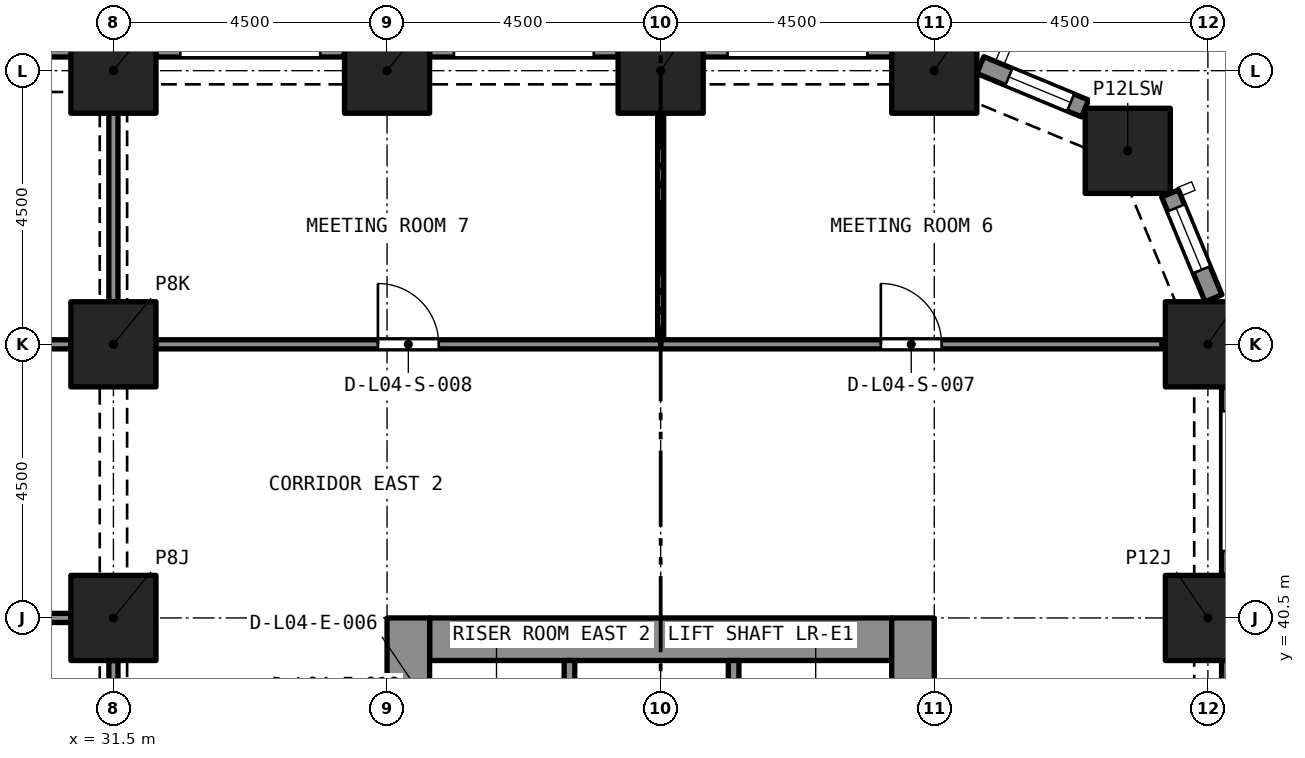
"""IFC4 building model, lengths in metres.
Left out: names, types, materials, properties, quantities, classifications, styles, units other than length and angle.
Written with IfcOpenShell. Run it as: python <this file> out.ifc"""

import sys

from ifc_helpers import new_model, si_unit, direction, frame, frame_2d, origin, origin_2d, place, context, subcontext, project, spatial, rectangle, extrude, element, fill, save


model = new_model("IFC4")
c1 = context("Model", 3, precision=1e-05, world=origin(), true_north=direction((0.0, 1.0)))
c2 = subcontext(c1, "Body", "Model", "MODEL_VIEW")
j1 = project(units=[si_unit("LENGTHUNIT", "METRE"), si_unit("PLANEANGLEUNIT", "RADIAN")], contexts=[c1])
p1 = place(None, origin())
s1 = spatial("IfcSite", under=j1, at=p1, CompositionType="ELEMENT")
p2 = place(p1, origin())
s2 = spatial("IfcBuilding", under=s1, at=p2, CompositionType="ELEMENT")
p3 = place(p2, frame((0.0, 0.0, 21.0)))
s3 = spatial("IfcBuildingStorey", under=s2, at=p3, CompositionType="ELEMENT", Elevation=21.0)
for number, where, z_axis, x_axis in (
    (1, (31.5, 40.5, 0.0), (0.0, 0.0, 1.0), (1.0, 0.0, 0.0)),
    (2, (49.5, 40.5, 0.0), (0.0, 0.0, 1.0), (1.0, 0.0, 0.0)),
    (3, (31.5, 45.0, 0.0), (0.0, 0.0, 1.0), (1.0, 0.0, 0.0)),
    (4, (49.5, 45.0, 0.0), (0.0, 0.0, 1.0), (1.0, 0.0, 0.0)),
    (5, (48.182, 48.182, 0.0), (0.0, 0.0, 1.0), (1.0, 0.0, 0.0)),
    (6, (31.5, 49.5, 0.0), (0.0, 0.0, 1.0), (1.0, 0.0, 0.0)),
    (7, (36.0, 49.5, 0.0), (0.0, 0.0, 1.0), (1.0, 0.0, 0.0)),
    (8, (40.5, 49.5, 0.0), (0.0, 0.0, 1.0), (1.0, 0.0, 0.0)),
    (9, (45.0, 49.5, 0.0), (0.0, 0.0, 1.0), (1.0, 0.0, 0.0)),
):
    element("IfcColumn", number, at=place(p3, frame(where, z_axis=z_axis, x_axis=x_axis)), inside=s3, PredefinedType="COLUMN", context=c2, shape_type="SweptSolid", body=[
        extrude(rectangle(XDim=1.4, YDim=1.4, at=origin_2d()), origin(), (0.0, 0.0, 1.0), 5.0),
    ])
p4 = place(p3, frame((36.7, 40.15, 0.0), z_axis=(0.0, 0.0, 1.0), x_axis=(1.0, 0.0, 0.0)))
e10 = element("IfcWall", 10, at=p4, inside=s3, PredefinedType="SOLIDWALL", context=c2, shape_type="SweptSolid", body=[
    extrude(rectangle(XDim=7.6, YDim=0.7, at=frame_2d((3.8, 0.0))), origin(), (0.0, 0.0, 1.0), 5.0),
])
p5 = place(p3, frame((36.35, 27.0, 0.0), z_axis=(0.0, 0.0, 1.0), x_axis=(0.0, 1.0, 0.0)))
e11 = element("IfcWall", 11, at=p5, inside=s3, PredefinedType="SOLIDWALL", context=c2, shape_type="SweptSolid", body=[
    extrude(rectangle(XDim=13.5, YDim=0.7, at=frame_2d((6.75, 0.0))), origin(), (0.0, 0.0, 1.0), 5.0),
])
p6 = place(p5, frame((8.95, 0.0, 0.0)))
e12 = element("IfcOpeningElement", 12, at=p6, cuts=e11, PredefinedType="OPENING", context=c2, shape_type="SweptSolid", body=[
    extrude(rectangle(XDim=1.2, YDim=2.1, at=frame_2d((0.6, 1.05))), frame((0.0, 0.36, 0.0), z_axis=(0.0, -1.0, 0.0), x_axis=(1.0, 0.0, 0.0)), (0.0, 0.0, 1.0), 0.72),
])
p7 = place(p3, frame((44.65, 27.0, 0.0), z_axis=(0.0, 0.0, 1.0), x_axis=(0.0, 1.0, 0.0)))
e13 = element("IfcWall", 13, at=p7, inside=s3, PredefinedType="SOLIDWALL", context=c2, shape_type="SweptSolid", body=[
    extrude(rectangle(XDim=13.5, YDim=0.7, at=frame_2d((6.75, 0.0))), origin(), (0.0, 0.0, 1.0), 5.0),
])
p8 = place(p7, frame((8.95, 0.0, 0.0)))
e14 = element("IfcOpeningElement", 14, at=p8, cuts=e13, PredefinedType="OPENING", context=c2, shape_type="SweptSolid", body=[
    extrude(rectangle(XDim=1.2, YDim=2.1, at=frame_2d((0.6, 1.05))), frame((0.0, 0.36, 0.0), z_axis=(0.0, -1.0, 0.0), x_axis=(1.0, 0.0, 0.0)), (0.0, 0.0, 1.0), 0.72),
])
p9 = place(p3, frame((49.875, 39.8, 0.0), z_axis=(0.0, 0.0, 1.0), x_axis=(0.0, -1.0, 0.0)))
e15 = element("IfcWall", 15, at=p9, inside=s3, PredefinedType="SOLIDWALL", context=c2, shape_type="SweptSolid", body=[
    extrude(rectangle(XDim=3.1, YDim=0.3, at=frame_2d((1.55, 0.0))), origin(), (0.0, 0.0, 1.0), 5.0),
])
p10 = place(p9, frame((0.4, 0.0, 0.45)))
e16 = element("IfcOpeningElement", 16, at=p10, cuts=e15, PredefinedType="OPENING", context=c2, shape_type="SweptSolid", body=[
    extrude(rectangle(XDim=2.3, YDim=3.3, at=frame_2d((1.15, 1.65))), frame((0.0, 0.16, 0.0), z_axis=(0.0, -1.0, 0.0), x_axis=(1.0, 0.0, 0.0)), (0.0, 0.0, 1.0), 0.32),
])
p11 = place(p3, frame((49.875, 44.3, 0.0), z_axis=(0.0, 0.0, 1.0), x_axis=(0.0, -1.0, 0.0)))
e17 = element("IfcWall", 17, at=p11, inside=s3, PredefinedType="SOLIDWALL", context=c2, shape_type="SweptSolid", body=[
    extrude(rectangle(XDim=3.1, YDim=0.3, at=frame_2d((1.55, 0.0))), origin(), (0.0, 0.0, 1.0), 5.0),
])
p12 = place(p11, frame((0.4, 0.0, 0.45)))
e18 = element("IfcOpeningElement", 18, at=p12, cuts=e17, PredefinedType="OPENING", context=c2, shape_type="SweptSolid", body=[
    extrude(rectangle(XDim=2.3, YDim=3.3, at=frame_2d((1.15, 1.65))), frame((0.0, 0.16, 0.0), z_axis=(0.0, -1.0, 0.0), x_axis=(1.0, 0.0, 0.0)), (0.0, 0.0, 1.0), 0.32),
])
p13 = place(p3, frame((48.878, 47.48, 0.0), z_axis=(0.0, 0.0, 1.0), x_axis=(0.38262540684, -0.923903565336, 0.0)))
e19 = element("IfcWall", 19, at=p13, inside=s3, PredefinedType="SOLIDWALL", context=c2, shape_type="SweptSolid", body=[
    extrude(rectangle(XDim=1.865, YDim=0.3, at=frame_2d((0.933, 0.0))), origin(), (0.0, 0.0, 1.0), 5.0),
])
p14 = place(p13, frame((0.258, 0.0, 0.45)))
e20 = element("IfcOpeningElement", 20, at=p14, cuts=e19, PredefinedType="OPENING", context=c2, shape_type="SweptSolid", body=[
    extrude(rectangle(XDim=1.1, YDim=3.3, at=frame_2d((0.55, 1.65))), frame((0.0, 0.16, 0.0), z_axis=(0.0, -1.0, 0.0), x_axis=(1.0, 0.0, 0.0)), (0.0, 0.0, 1.0), 0.32),
])
p15 = place(p3, frame((45.757, 49.592, 0.0), z_axis=(0.0, 0.0, 1.0), x_axis=(0.923857286003, -0.382737135771, 0.0)))
e21 = element("IfcWall", 21, at=p15, inside=s3, PredefinedType="SOLIDWALL", context=c2, shape_type="SweptSolid", body=[
    extrude(rectangle(XDim=1.865, YDim=0.3, at=frame_2d((0.933, 0.0))), origin(), (0.0, 0.0, 1.0), 5.0),
])
p16 = place(p15, frame((0.508, 0.0, 0.45)))
e22 = element("IfcOpeningElement", 22, at=p16, cuts=e21, PredefinedType="OPENING", context=c2, shape_type="SweptSolid", body=[
    extrude(rectangle(XDim=1.1, YDim=3.3, at=frame_2d((0.55, 1.65))), frame((0.0, 0.16, 0.0), z_axis=(0.0, -1.0, 0.0), x_axis=(1.0, 0.0, 0.0)), (0.0, 0.0, 1.0), 0.32),
])
p17 = place(p3, frame((41.2, 49.875, 0.0), z_axis=(0.0, 0.0, 1.0), x_axis=(1.0, 0.0, 0.0)))
e23 = element("IfcWall", 23, at=p17, inside=s3, PredefinedType="SOLIDWALL", context=c2, shape_type="SweptSolid", body=[
    extrude(rectangle(XDim=3.1, YDim=0.3, at=frame_2d((1.55, 0.0))), origin(), (0.0, 0.0, 1.0), 5.0),
])
p18 = place(p17, frame((0.4, 0.0, 0.45)))
e24 = element("IfcOpeningElement", 24, at=p18, cuts=e23, PredefinedType="OPENING", context=c2, shape_type="SweptSolid", body=[
    extrude(rectangle(XDim=2.3, YDim=3.3, at=frame_2d((1.15, 1.65))), frame((0.0, 0.16, 0.0), z_axis=(0.0, -1.0, 0.0), x_axis=(1.0, 0.0, 0.0)), (0.0, 0.0, 1.0), 0.32),
])
p19 = place(p3, frame((36.7, 49.875, 0.0), z_axis=(0.0, 0.0, 1.0), x_axis=(1.0, 0.0, 0.0)))
e25 = element("IfcWall", 25, at=p19, inside=s3, PredefinedType="SOLIDWALL", context=c2, shape_type="SweptSolid", body=[
    extrude(rectangle(XDim=3.1, YDim=0.3, at=frame_2d((1.55, 0.0))), origin(), (0.0, 0.0, 1.0), 5.0),
])
p20 = place(p19, frame((0.4, 0.0, 0.45)))
e26 = element("IfcOpeningElement", 26, at=p20, cuts=e25, PredefinedType="OPENING", context=c2, shape_type="SweptSolid", body=[
    extrude(rectangle(XDim=2.3, YDim=3.3, at=frame_2d((1.15, 1.65))), frame((0.0, 0.16, 0.0), z_axis=(0.0, -1.0, 0.0), x_axis=(1.0, 0.0, 0.0)), (0.0, 0.0, 1.0), 0.32),
])
p21 = place(p3, frame((32.2, 49.875, 0.0), z_axis=(0.0, 0.0, 1.0), x_axis=(1.0, 0.0, 0.0)))
e27 = element("IfcWall", 27, at=p21, inside=s3, PredefinedType="SOLIDWALL", context=c2, shape_type="SweptSolid", body=[
    extrude(rectangle(XDim=3.1, YDim=0.3, at=frame_2d((1.55, 0.0))), origin(), (0.0, 0.0, 1.0), 5.0),
])
p22 = place(p21, frame((0.4, 0.0, 0.45)))
e28 = element("IfcOpeningElement", 28, at=p22, cuts=e27, PredefinedType="OPENING", context=c2, shape_type="SweptSolid", body=[
    extrude(rectangle(XDim=2.3, YDim=3.3, at=frame_2d((1.15, 1.65))), frame((0.0, 0.16, 0.0), z_axis=(0.0, -1.0, 0.0), x_axis=(1.0, 0.0, 0.0)), (0.0, 0.0, 1.0), 0.32),
])
p23 = place(p3, frame((27.475, 49.875, 0.0), z_axis=(0.0, 0.0, 1.0), x_axis=(1.0, 0.0, 0.0)))
e29 = element("IfcWall", 29, at=p23, inside=s3, PredefinedType="SOLIDWALL", context=c2, shape_type="SweptSolid", body=[
    extrude(rectangle(XDim=3.325, YDim=0.3, at=frame_2d((1.663, 0.0))), origin(), (0.0, 0.0, 1.0), 5.0),
])
p24 = place(p23, frame((0.575, 0.0, 0.45)))
e30 = element("IfcOpeningElement", 30, at=p24, cuts=e29, PredefinedType="OPENING", context=c2, shape_type="SweptSolid", body=[
    extrude(rectangle(XDim=2.4, YDim=3.3, at=frame_2d((1.2, 1.65))), frame((0.0, 0.16, 0.0), z_axis=(0.0, -1.0, 0.0), x_axis=(1.0, 0.0, 0.0)), (0.0, 0.0, 1.0), 0.32),
])
for number, where, z_axis, x_axis in (
    (31, (41.7, 37.5, 0.0), (0.0, 0.0, 1.0), (0.0, 1.0, 0.0)),
    (32, (39.0, 37.5, 0.0), (0.0, 0.0, 1.0), (0.0, 1.0, 0.0)),
):
    element("IfcWall", number, at=place(p3, frame(where, z_axis=z_axis, x_axis=x_axis)), inside=s3, PredefinedType="SOLIDWALL", context=c2, shape_type="SweptSolid", body=[
        extrude(rectangle(XDim=2.3, YDim=0.175, at=frame_2d((1.15, 0.0))), origin(), (0.0, 0.0, 1.0), 4.65),
    ])
p25 = place(p3, frame((30.8, 40.5, 0.0), z_axis=(0.0, 0.0, 1.0), x_axis=(-1.0, 0.0, 0.0)))
e33 = element("IfcWall", 33, at=p25, inside=s3, PredefinedType="PARTITIONING", context=c2, shape_type="SweptSolid", body=[
    extrude(rectangle(XDim=12.1, YDim=0.15, at=frame_2d((6.05, 0.0))), origin(), (0.0, 0.0, 1.0), 4.55),
])
p26 = place(p25, frame((5.45, 0.0, 0.0)))
e34 = element("IfcOpeningElement", 34, at=p26, cuts=e33, PredefinedType="OPENING", context=c2, shape_type="SweptSolid", body=[
    extrude(rectangle(XDim=1.2, YDim=2.1, at=frame_2d((0.6, 1.05))), frame((0.0, 0.085, 0.0), z_axis=(0.0, -1.0, 0.0), x_axis=(1.0, 0.0, 0.0)), (0.0, 0.0, 1.0), 0.17),
])
p27 = place(p3, frame((31.5, 36.7, 0.0), z_axis=(0.0, 0.0, 1.0), x_axis=(0.0, 1.0, 0.0)))
e35 = element("IfcWall", 35, at=p27, inside=s3, PredefinedType="PARTITIONING", context=c2, shape_type="SweptSolid", body=[
    extrude(rectangle(XDim=3.1, YDim=0.15, at=frame_2d((1.55, 0.0))), origin(), (0.0, 0.0, 1.0), 4.18),
])
p28 = place(p3, frame((27.0, 45.0, 0.0), z_axis=(0.0, 0.0, 1.0), x_axis=(1.0, 0.0, 0.0)))
e36 = element("IfcWall", 36, at=p28, inside=s3, PredefinedType="PARTITIONING", context=c2, shape_type="SweptSolid", body=[
    extrude(rectangle(XDim=3.8, YDim=0.15, at=frame_2d((1.9, 0.0))), origin(), (0.0, 0.0, 1.0), 4.55),
])
p29 = place(p28, frame((1.5, 0.0, 0.0)))
e37 = element("IfcOpeningElement", 37, at=p29, cuts=e36, PredefinedType="OPENING", context=c2, shape_type="SweptSolid", body=[
    extrude(rectangle(XDim=0.8, YDim=2.1, at=frame_2d((0.4, 1.05))), frame((0.0, 0.085, 0.0), z_axis=(0.0, -1.0, 0.0), x_axis=(1.0, 0.0, 0.0)), (0.0, 0.0, 1.0), 0.17),
])
p30 = place(p3, frame((31.5, 45.7, 0.0), z_axis=(0.0, 0.0, 1.0), x_axis=(0.0, 1.0, 0.0)))
e38 = element("IfcWall", 38, at=p30, inside=s3, PredefinedType="PARTITIONING", context=c2, shape_type="SweptSolid", body=[
    extrude(rectangle(XDim=3.1, YDim=0.15, at=frame_2d((1.55, 0.0))), origin(), (0.0, 0.0, 1.0), 4.18),
])
p31 = place(p3, frame((40.5, 45.075, 0.0), z_axis=(0.0, 0.0, 1.0), x_axis=(0.0, 1.0, 0.0)))
e39 = element("IfcWall", 39, at=p31, inside=s3, PredefinedType="PARTITIONING", context=c2, shape_type="SweptSolid", body=[
    extrude(rectangle(XDim=3.725, YDim=0.1, at=frame_2d((1.863, 0.0))), origin(), (0.0, 0.0, 1.0), 4.65),
])
p32 = place(p3, frame((40.5, 45.0, 0.0), z_axis=(0.0, 0.0, 1.0), x_axis=(1.0, 0.0, 0.0)))
e40 = element("IfcWall", 40, at=p32, inside=s3, PredefinedType="PARTITIONING", context=c2, shape_type="SweptSolid", body=[
    extrude(rectangle(XDim=8.242, YDim=0.15, at=frame_2d((4.121, 0.0))), origin(), (0.0, 0.0, 1.0), 4.65),
])
p33 = place(p32, frame((3.621, 0.0, 0.0)))
e41 = element("IfcOpeningElement", 41, at=p33, cuts=e40, PredefinedType="OPENING", context=c2, shape_type="SweptSolid", body=[
    extrude(rectangle(XDim=1.0, YDim=2.1, at=frame_2d((0.5, 1.05))), frame((0.0, 0.085, 0.0), z_axis=(0.0, -1.0, 0.0), x_axis=(1.0, 0.0, 0.0)), (0.0, 0.0, 1.0), 0.17),
])
p34 = place(p3, frame((32.2, 45.0, 0.0), z_axis=(0.0, 0.0, 1.0), x_axis=(1.0, 0.0, 0.0)))
e42 = element("IfcWall", 42, at=p34, inside=s3, PredefinedType="PARTITIONING", context=c2, shape_type="SweptSolid", body=[
    extrude(rectangle(XDim=8.3, YDim=0.15, at=frame_2d((4.15, 0.0))), origin(), (0.0, 0.0, 1.0), 4.65),
])
p35 = place(p34, frame((3.65, 0.0, 0.0)))
e43 = element("IfcOpeningElement", 43, at=p35, cuts=e42, PredefinedType="OPENING", context=c2, shape_type="SweptSolid", body=[
    extrude(rectangle(XDim=1.0, YDim=2.1, at=frame_2d((0.5, 1.05))), frame((0.0, 0.085, 0.0), z_axis=(0.0, -1.0, 0.0), x_axis=(1.0, 0.0, 0.0)), (0.0, 0.0, 1.0), 0.17),
])
p36 = place(p14, origin())
e44 = element("IfcWindow", 44, at=p36, inside=s3, PartitioningType="SINGLE_PANEL", PredefinedType="WINDOW", context=c2, shape_type="SweptSolid", body=[
    extrude(rectangle(XDim=1.1, YDim=3.3, at=frame_2d((0.55, 1.65))), frame((0.0, 0.03, 0.0), z_axis=(0.0, -1.0, 0.0), x_axis=(1.0, 0.0, 0.0)), (0.0, 0.0, 1.0), 0.06),
])
fill(e20, e44)
p37 = place(p16, origin())
e45 = element("IfcWindow", 45, at=p37, inside=s3, PartitioningType="SINGLE_PANEL", PredefinedType="WINDOW", context=c2, shape_type="SweptSolid", body=[
    extrude(rectangle(XDim=1.1, YDim=3.3, at=frame_2d((0.55, 1.65))), frame((0.0, 0.03, 0.0), z_axis=(0.0, -1.0, 0.0), x_axis=(1.0, 0.0, 0.0)), (0.0, 0.0, 1.0), 0.06),
])
fill(e22, e45)
p38 = place(p33, origin())
e46 = element("IfcDoor", 46, at=p38, inside=s3, OperationType="SINGLE_SWING_RIGHT", PredefinedType="DOOR", context=c2, shape_type="SweptSolid", body=[
    extrude(rectangle(XDim=1.0, YDim=2.1, at=frame_2d((0.5, 1.05))), frame((0.0, 0.025, 0.0), z_axis=(0.0, -1.0, 0.0), x_axis=(1.0, 0.0, 0.0)), (0.0, 0.0, 1.0), 0.05),
])
fill(e41, e46)
p39 = place(p35, origin())
e47 = element("IfcDoor", 47, at=p39, inside=s3, OperationType="SINGLE_SWING_RIGHT", PredefinedType="DOOR", context=c2, shape_type="SweptSolid", body=[
    extrude(rectangle(XDim=1.0, YDim=2.1, at=frame_2d((0.5, 1.05))), frame((0.0, 0.025, 0.0), z_axis=(0.0, -1.0, 0.0), x_axis=(1.0, 0.0, 0.0)), (0.0, 0.0, 1.0), 0.05),
])
fill(e43, e47)
save(model, sys.argv[1])
